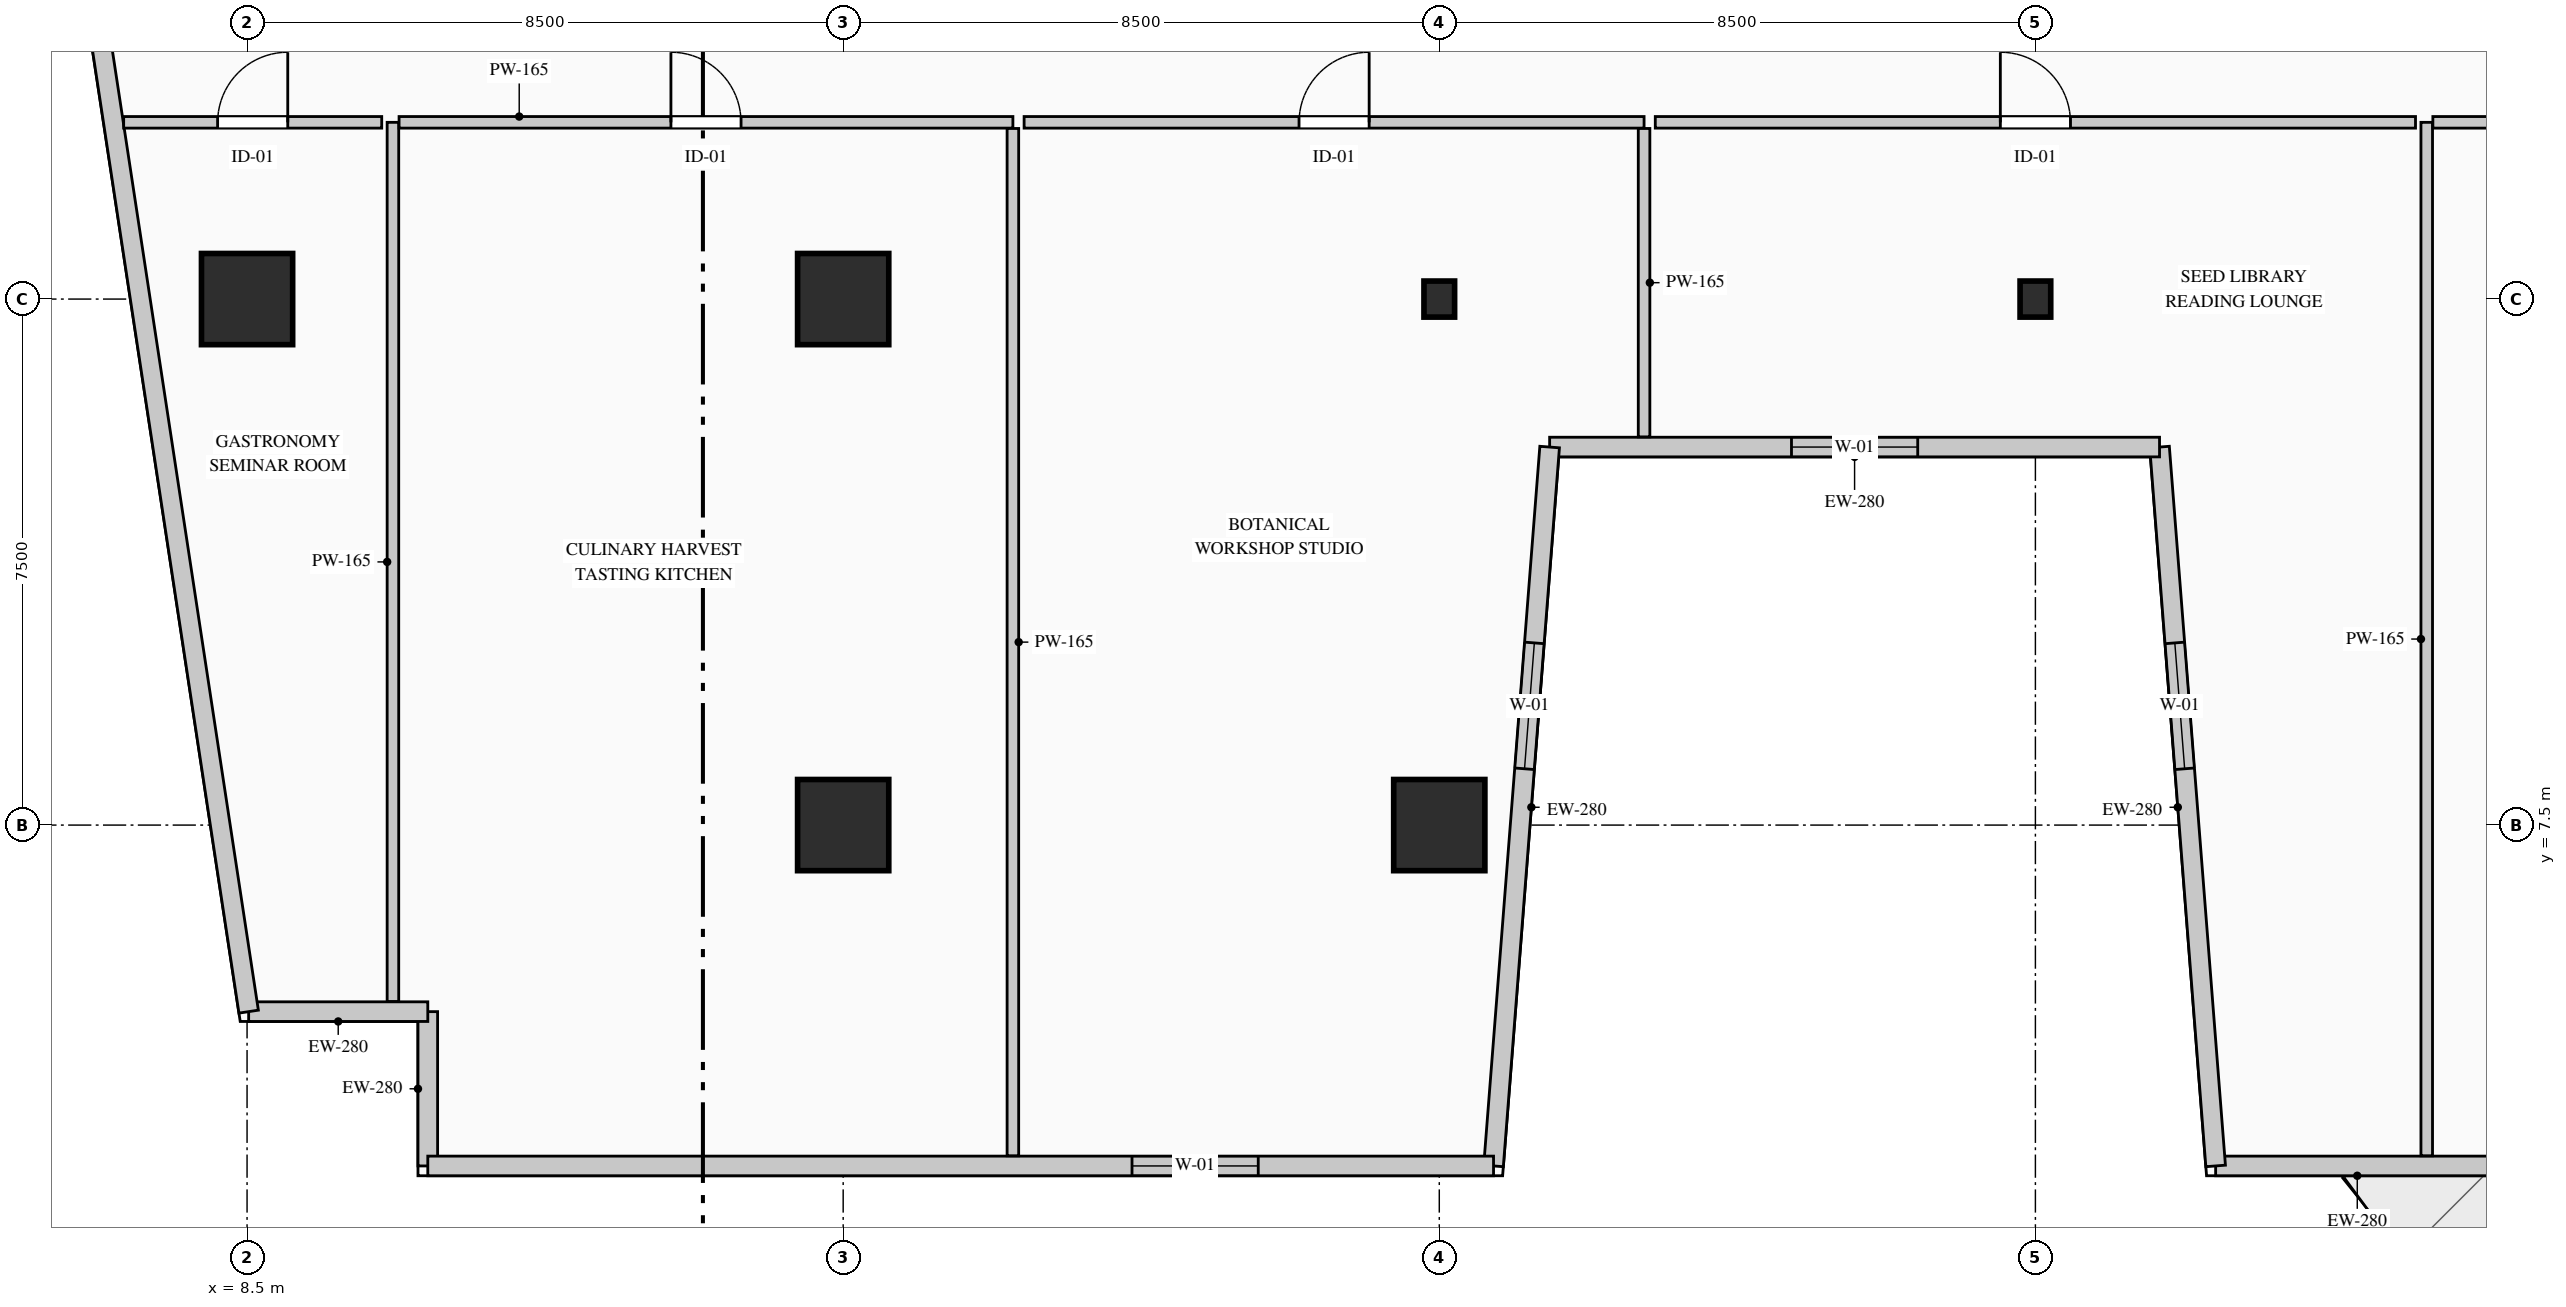
"""IFC4 building model, lengths in metres.
Left out: names, types, materials, properties, quantities, classifications, styles, units other than length and angle.
Written with IfcOpenShell. Run it as: python <this file> out.ifc"""

import sys

from ifc_helpers import new_model, si_unit, direction, frame, frame_2d, origin, origin_2d, place, context, subcontext, project, spatial, rectangle, i_section, extrude, element, fill, save


model = new_model("IFC4")
c1 = context("Model", 3, precision=1e-05, world=origin(), true_north=direction((0.0, 1.0)))
c2 = subcontext(c1, "Body", "Model", "MODEL_VIEW")
j1 = project(units=[si_unit("LENGTHUNIT", "METRE"), si_unit("PLANEANGLEUNIT", "RADIAN")], contexts=[c1])
p1 = place(None, origin())
s1 = spatial("IfcSite", under=j1, at=p1, CompositionType="ELEMENT")
p2 = place(p1, origin())
s2 = spatial("IfcBuilding", under=s1, at=p2, CompositionType="ELEMENT")
p3 = place(p2, frame((0.0, 0.0, 84.2)))
s3 = spatial("IfcBuildingStorey", under=s2, at=p3, CompositionType="ELEMENT", Elevation=84.2)
for number, where, z_axis, x_axis in (
    (1, (8.5, 15.0, 0.0), (0.0, 0.0, 1.0), (1.0, 0.0, 0.0)),
    (2, (17.0, 7.5, 0.0), (0.0, 0.0, 1.0), (1.0, 0.0, 0.0)),
    (3, (17.0, 15.0, 0.0), (0.0, 0.0, 1.0), (1.0, 0.0, 0.0)),
    (4, (25.5, 7.5, 0.0), (0.0, 0.0, 1.0), (1.0, 0.0, 0.0)),
):
    element("IfcColumn", number, at=place(p3, frame(where, z_axis=z_axis, x_axis=x_axis)), inside=s3, PredefinedType="COLUMN", context=c2, shape_type="SweptSolid", body=[
        extrude(rectangle(XDim=1.3, YDim=1.3, at=origin_2d()), origin(), (0.0, 0.0, 1.0), 4.4),
    ])
for number, where, z_axis, x_axis in (
    (5, (25.5, 15.0, 0.0), (0.0, 0.0, 1.0), (1.0, 0.0, 0.0)),
    (6, (34.0, 15.0, 0.0), (0.0, 0.0, 1.0), (1.0, 0.0, 0.0)),
):
    element("IfcColumn", number, at=place(p3, frame(where, z_axis=z_axis, x_axis=x_axis)), inside=s3, PredefinedType="COLUMN", context=c2, shape_type="SweptSolid", body=[
        extrude(i_section(OverallWidth=0.437, OverallDepth=0.514, WebThickness=0.061, FlangeThickness=0.077, FilletRadius=0.015, at=origin_2d()), origin(), (0.0, 0.0, 1.0), 4.4),
    ])
p4 = place(p3, frame((11.077, 2.64, 0.0), z_axis=(0.0, 0.0, 1.0), x_axis=(0.0, 1.0, 0.0)))
e7 = element("IfcWall", 7, at=p4, inside=s3, PredefinedType="STANDARD", context=c2, shape_type="SweptSolid", body=[
    extrude(rectangle(XDim=2.2, YDim=0.28, at=frame_2d((1.1, 0.0))), origin(), (0.0, 0.0, 1.0), 4.115),
])
p5 = place(p3, frame((11.077, 4.84, 0.0), z_axis=(0.0, 0.0, 1.0), x_axis=(-1.0, 0.0, 0.0)))
e8 = element("IfcWall", 8, at=p5, inside=s3, PredefinedType="STANDARD", context=c2, shape_type="SweptSolid", body=[
    extrude(rectangle(XDim=2.554, YDim=0.28, at=frame_2d((1.277, 0.0))), origin(), (0.0, 0.0, 1.0), 4.115),
])
p6 = place(p3, frame((8.523, 4.84, 0.0), z_axis=(0.0, 0.0, 1.0), x_axis=(-0.150394554312, 0.988626055712, 0.0)))
e9 = element("IfcWall", 9, at=p6, inside=s3, PredefinedType="STANDARD", context=c2, shape_type="SweptSolid", body=[
    extrude(rectangle(XDim=36.738, YDim=0.28, at=frame_2d((18.369, 0.0))), origin(), (0.0, 0.0, 1.0), 4.115),
])
p7 = place(p6, frame((22.612, 0.0, 0.9)))
e10 = element("IfcOpeningElement", 10, at=p7, cuts=e9, PredefinedType="OPENING", context=c2, shape_type="SweptSolid", body=[
    extrude(rectangle(XDim=1.8, YDim=2.1, at=frame_2d((0.9, 1.05))), frame((0.0, 0.15, 0.0), z_axis=(0.0, -1.0, 0.0), x_axis=(1.0, 0.0, 0.0)), (0.0, 0.0, 1.0), 0.3),
])
p8 = place(p3, frame((46.547, 2.64, 0.0), z_axis=(0.0, 0.0, 1.0), x_axis=(-1.0, 0.0, 0.0)))
e11 = element("IfcWall", 11, at=p8, inside=s3, PredefinedType="STANDARD", context=c2, shape_type="SweptSolid", body=[
    extrude(rectangle(XDim=9.977, YDim=0.28, at=frame_2d((4.989, 0.0))), origin(), (0.0, 0.0, 1.0), 4.115),
])
p9 = place(p8, frame((4.388, 0.0, 0.0)))
e12 = element("IfcOpeningElement", 12, at=p9, cuts=e11, PredefinedType="OPENING", context=c2, shape_type="SweptSolid", body=[
    extrude(rectangle(XDim=1.2, YDim=2.2, at=frame_2d((0.6, 1.1))), frame((0.0, 0.15, 0.0), z_axis=(0.0, -1.0, 0.0), x_axis=(1.0, 0.0, 0.0)), (0.0, 0.0, 1.0), 0.3),
])
p10 = place(p3, frame((36.57, 2.64, 0.0), z_axis=(0.0, 0.0, 1.0), x_axis=(-0.077816860153, 0.996967670627, 0.0)))
e13 = element("IfcWall", 13, at=p10, inside=s3, PredefinedType="STANDARD", context=c2, shape_type="SweptSolid", body=[
    extrude(rectangle(XDim=10.281, YDim=0.28, at=frame_2d((5.141, 0.0))), origin(), (0.0, 0.0, 1.0), 4.115),
])
p11 = place(p10, frame((5.68, 0.0, 0.9)))
e14 = element("IfcOpeningElement", 14, at=p11, cuts=e13, PredefinedType="OPENING", context=c2, shape_type="SweptSolid", body=[
    extrude(rectangle(XDim=1.8, YDim=2.1, at=frame_2d((0.9, 1.05))), frame((0.0, 0.15, 0.0), z_axis=(0.0, -1.0, 0.0), x_axis=(1.0, 0.0, 0.0)), (0.0, 0.0, 1.0), 0.3),
])
p12 = place(p3, frame((35.77, 12.89, 0.0), z_axis=(0.0, 0.0, 1.0), x_axis=(-1.0, 0.0, 0.0)))
e15 = element("IfcWall", 15, at=p12, inside=s3, PredefinedType="STANDARD", context=c2, shape_type="SweptSolid", body=[
    extrude(rectangle(XDim=8.697, YDim=0.28, at=frame_2d((4.348, 0.0))), origin(), (0.0, 0.0, 1.0), 4.115),
])
p13 = place(p12, frame((3.448, 0.0, 0.9)))
e16 = element("IfcOpeningElement", 16, at=p13, cuts=e15, PredefinedType="OPENING", context=c2, shape_type="SweptSolid", body=[
    extrude(rectangle(XDim=1.8, YDim=2.1, at=frame_2d((0.9, 1.05))), frame((0.0, 0.15, 0.0), z_axis=(0.0, -1.0, 0.0), x_axis=(1.0, 0.0, 0.0)), (0.0, 0.0, 1.0), 0.3),
])
p14 = place(p3, frame((27.073, 12.89, 0.0), z_axis=(0.0, 0.0, 1.0), x_axis=(-0.077816860153, -0.996967670627, 0.0)))
e17 = element("IfcWall", 17, at=p14, inside=s3, PredefinedType="STANDARD", context=c2, shape_type="SweptSolid", body=[
    extrude(rectangle(XDim=10.281, YDim=0.28, at=frame_2d((5.141, 0.0))), origin(), (0.0, 0.0, 1.0), 4.115),
])
p15 = place(p14, frame((2.801, 0.0, 0.9)))
e18 = element("IfcOpeningElement", 18, at=p15, cuts=e17, PredefinedType="OPENING", context=c2, shape_type="SweptSolid", body=[
    extrude(rectangle(XDim=1.8, YDim=2.1, at=frame_2d((0.9, 1.05))), frame((0.0, 0.15, 0.0), z_axis=(0.0, -1.0, 0.0), x_axis=(1.0, 0.0, 0.0)), (0.0, 0.0, 1.0), 0.3),
])
p16 = place(p3, frame((26.273, 2.64, 0.0), z_axis=(0.0, 0.0, 1.0), x_axis=(-1.0, 0.0, 0.0)))
e19 = element("IfcWall", 19, at=p16, inside=s3, PredefinedType="STANDARD", context=c2, shape_type="SweptSolid", body=[
    extrude(rectangle(XDim=15.197, YDim=0.28, at=frame_2d((7.598, 0.0))), origin(), (0.0, 0.0, 1.0), 4.115),
])
p17 = place(p16, frame((3.355, 0.0, 0.9)))
e20 = element("IfcOpeningElement", 20, at=p17, cuts=e19, PredefinedType="OPENING", context=c2, shape_type="SweptSolid", body=[
    extrude(rectangle(XDim=1.8, YDim=2.1, at=frame_2d((0.9, 1.05))), frame((0.0, 0.15, 0.0), z_axis=(0.0, -1.0, 0.0), x_axis=(1.0, 0.0, 0.0)), (0.0, 0.0, 1.0), 0.3),
])
p18 = place(p3, frame((10.58, 4.985, 0.0), z_axis=(0.0, 0.0, 1.0), x_axis=(0.0, 1.0, 0.0)))
e21 = element("IfcWall", 21, at=p18, inside=s3, PredefinedType="PARTITIONING", context=c2, shape_type="SweptSolid", body=[
    extrude(rectangle(XDim=12.535, YDim=0.165, at=frame_2d((6.268, 0.0))), origin(), (0.0, 0.0, 1.0), 4.115),
])
p19 = place(p3, frame((10.667, 17.52, 0.0), z_axis=(0.0, 0.0, 1.0), x_axis=(1.0, 0.0, 0.0)))
e22 = element("IfcWall", 22, at=p19, inside=s3, PredefinedType="PARTITIONING", context=c2, shape_type="SweptSolid", body=[
    extrude(rectangle(XDim=8.752, YDim=0.165, at=frame_2d((4.376, 0.0))), origin(), (0.0, 0.0, 1.0), 4.115),
])
p20 = place(p19, frame((3.876, 0.0, 0.0)))
e23 = element("IfcOpeningElement", 23, at=p20, cuts=e22, PredefinedType="OPENING", context=c2, shape_type="SweptSolid", body=[
    extrude(rectangle(XDim=1.0, YDim=2.15, at=frame_2d((0.5, 1.075))), frame((0.0, 0.093, 0.0), z_axis=(0.0, -1.0, 0.0), x_axis=(1.0, 0.0, 0.0)), (0.0, 0.0, 1.0), 0.185),
])
p21 = place(p3, frame((19.42, 17.433, 0.0), z_axis=(0.0, 0.0, 1.0), x_axis=(0.0, -1.0, 0.0)))
e24 = element("IfcWall", 24, at=p21, inside=s3, PredefinedType="PARTITIONING", context=c2, shape_type="SweptSolid", body=[
    extrude(rectangle(XDim=14.648, YDim=0.165, at=frame_2d((7.324, 0.0))), origin(), (0.0, 0.0, 1.0), 3.8),
])
p22 = place(p3, frame((19.58, 17.52, 0.0), z_axis=(0.0, 0.0, 1.0), x_axis=(1.0, 0.0, 0.0)))
e25 = element("IfcWall", 25, at=p22, inside=s3, PredefinedType="PARTITIONING", context=c2, shape_type="SweptSolid", body=[
    extrude(rectangle(XDim=8.84, YDim=0.165, at=frame_2d((4.42, 0.0))), origin(), (0.0, 0.0, 1.0), 3.8),
])
p23 = place(p22, frame((3.92, 0.0, 0.0)))
e26 = element("IfcOpeningElement", 26, at=p23, cuts=e25, PredefinedType="OPENING", context=c2, shape_type="SweptSolid", body=[
    extrude(rectangle(XDim=1.0, YDim=2.15, at=frame_2d((0.5, 1.075))), frame((0.0, 0.093, 0.0), z_axis=(0.0, -1.0, 0.0), x_axis=(1.0, 0.0, 0.0)), (0.0, 0.0, 1.0), 0.185),
])
p24 = place(p3, frame((28.42, 17.433, 0.0), z_axis=(0.0, 0.0, 1.0), x_axis=(0.0, -1.0, 0.0)))
e27 = element("IfcWall", 27, at=p24, inside=s3, PredefinedType="PARTITIONING", context=c2, shape_type="SweptSolid", body=[
    extrude(rectangle(XDim=4.398, YDim=0.165, at=frame_2d((2.199, 0.0))), origin(), (0.0, 0.0, 1.0), 4.115),
])
p25 = place(p3, frame((39.58, 2.785, 0.0), z_axis=(0.0, 0.0, 1.0), x_axis=(0.0, 1.0, 0.0)))
e28 = element("IfcWall", 28, at=p25, inside=s3, PredefinedType="PARTITIONING", context=c2, shape_type="SweptSolid", body=[
    extrude(rectangle(XDim=14.735, YDim=0.165, at=frame_2d((7.368, 0.0))), origin(), (0.0, 0.0, 1.0), 4.115),
])
p26 = place(p3, frame((39.667, 17.52, 0.0), z_axis=(0.0, 0.0, 1.0), x_axis=(1.0, 0.0, 0.0)))
e29 = element("IfcWall", 29, at=p26, inside=s3, PredefinedType="PARTITIONING", context=c2, shape_type="SweptSolid", body=[
    extrude(rectangle(XDim=5.282, YDim=0.165, at=frame_2d((2.641, 0.0))), origin(), (0.0, 0.0, 1.0), 4.115),
])
p27 = place(p26, frame((2.141, 0.0, 0.0)))
e30 = element("IfcOpeningElement", 30, at=p27, cuts=e29, PredefinedType="OPENING", context=c2, shape_type="SweptSolid", body=[
    extrude(rectangle(XDim=1.0, YDim=2.15, at=frame_2d((0.5, 1.075))), frame((0.0, 0.093, 0.0), z_axis=(0.0, -1.0, 0.0), x_axis=(1.0, 0.0, 0.0)), (0.0, 0.0, 1.0), 0.185),
])
p28 = place(p3, frame((6.74, 17.52, 0.0), z_axis=(0.0, 0.0, 1.0), x_axis=(1.0, 0.0, 0.0)))
e31 = element("IfcWall", 31, at=p28, inside=s3, PredefinedType="PARTITIONING", context=c2, shape_type="SweptSolid", body=[
    extrude(rectangle(XDim=3.679, YDim=0.165, at=frame_2d((1.84, 0.0))), origin(), (0.0, 0.0, 1.0), 4.115),
])
p29 = place(p28, frame((1.34, 0.0, 0.0)))
e32 = element("IfcOpeningElement", 32, at=p29, cuts=e31, PredefinedType="OPENING", context=c2, shape_type="SweptSolid", body=[
    extrude(rectangle(XDim=1.0, YDim=2.15, at=frame_2d((0.5, 1.075))), frame((0.0, 0.093, 0.0), z_axis=(0.0, -1.0, 0.0), x_axis=(1.0, 0.0, 0.0)), (0.0, 0.0, 1.0), 0.185),
])
p30 = place(p3, frame((28.58, 17.52, 0.0), z_axis=(0.0, 0.0, 1.0), x_axis=(1.0, 0.0, 0.0)))
e33 = element("IfcWall", 33, at=p30, inside=s3, PredefinedType="PARTITIONING", context=c2, shape_type="SweptSolid", body=[
    extrude(rectangle(XDim=10.84, YDim=0.165, at=frame_2d((5.42, 0.0))), origin(), (0.0, 0.0, 1.0), 3.8),
])
p31 = place(p30, frame((4.92, 0.0, 0.0)))
e34 = element("IfcOpeningElement", 34, at=p31, cuts=e33, PredefinedType="OPENING", context=c2, shape_type="SweptSolid", body=[
    extrude(rectangle(XDim=1.0, YDim=2.15, at=frame_2d((0.5, 1.075))), frame((0.0, 0.093, 0.0), z_axis=(0.0, -1.0, 0.0), x_axis=(1.0, 0.0, 0.0)), (0.0, 0.0, 1.0), 0.185),
])
p32 = place(p11, origin())
e35 = element("IfcWindow", 35, at=p32, inside=s3, PartitioningType="SINGLE_PANEL", PredefinedType="WINDOW", context=c2, shape_type="SweptSolid", body=[
    extrude(rectangle(XDim=1.8, YDim=2.1, at=frame_2d((0.9, 1.05))), frame((0.0, 0.03, 0.0), z_axis=(0.0, -1.0, 0.0), x_axis=(1.0, 0.0, 0.0)), (0.0, 0.0, 1.0), 0.06),
])
fill(e14, e35)
p33 = place(p13, origin())
e36 = element("IfcWindow", 36, at=p33, inside=s3, PartitioningType="SINGLE_PANEL", PredefinedType="WINDOW", context=c2, shape_type="SweptSolid", body=[
    extrude(rectangle(XDim=1.8, YDim=2.1, at=frame_2d((0.9, 1.05))), frame((0.0, 0.03, 0.0), z_axis=(0.0, -1.0, 0.0), x_axis=(1.0, 0.0, 0.0)), (0.0, 0.0, 1.0), 0.06),
])
fill(e16, e36)
p34 = place(p15, origin())
e37 = element("IfcWindow", 37, at=p34, inside=s3, PartitioningType="SINGLE_PANEL", PredefinedType="WINDOW", context=c2, shape_type="SweptSolid", body=[
    extrude(rectangle(XDim=1.8, YDim=2.1, at=frame_2d((0.9, 1.05))), frame((0.0, 0.03, 0.0), z_axis=(0.0, -1.0, 0.0), x_axis=(1.0, 0.0, 0.0)), (0.0, 0.0, 1.0), 0.06),
])
fill(e18, e37)
p35 = place(p17, origin())
e38 = element("IfcWindow", 38, at=p35, inside=s3, PartitioningType="SINGLE_PANEL", PredefinedType="WINDOW", context=c2, shape_type="SweptSolid", body=[
    extrude(rectangle(XDim=1.8, YDim=2.1, at=frame_2d((0.9, 1.05))), frame((0.0, 0.03, 0.0), z_axis=(0.0, -1.0, 0.0), x_axis=(1.0, 0.0, 0.0)), (0.0, 0.0, 1.0), 0.06),
])
fill(e20, e38)
p36 = place(p20, origin())
e39 = element("IfcDoor", 39, at=p36, inside=s3, OperationType="SINGLE_SWING_LEFT", PredefinedType="DOOR", context=c2, shape_type="SweptSolid", body=[
    extrude(rectangle(XDim=1.0, YDim=2.15, at=frame_2d((0.5, 1.075))), frame((0.0, 0.025, 0.0), z_axis=(0.0, -1.0, 0.0), x_axis=(1.0, 0.0, 0.0)), (0.0, 0.0, 1.0), 0.05),
])
fill(e23, e39)
p37 = place(p23, origin())
e40 = element("IfcDoor", 40, at=p37, inside=s3, OperationType="SINGLE_SWING_RIGHT", PredefinedType="DOOR", context=c2, shape_type="SweptSolid", body=[
    extrude(rectangle(XDim=1.0, YDim=2.15, at=frame_2d((0.5, 1.075))), frame((0.0, 0.025, 0.0), z_axis=(0.0, -1.0, 0.0), x_axis=(1.0, 0.0, 0.0)), (0.0, 0.0, 1.0), 0.05),
])
fill(e26, e40)
p38 = place(p29, origin())
e41 = element("IfcDoor", 41, at=p38, inside=s3, OperationType="SINGLE_SWING_RIGHT", PredefinedType="DOOR", context=c2, shape_type="SweptSolid", body=[
    extrude(rectangle(XDim=1.0, YDim=2.15, at=frame_2d((0.5, 1.075))), frame((0.0, 0.025, 0.0), z_axis=(0.0, -1.0, 0.0), x_axis=(1.0, 0.0, 0.0)), (0.0, 0.0, 1.0), 0.05),
])
fill(e32, e41)
p39 = place(p31, origin())
e42 = element("IfcDoor", 42, at=p39, inside=s3, OperationType="SINGLE_SWING_LEFT", PredefinedType="DOOR", context=c2, shape_type="SweptSolid", body=[
    extrude(rectangle(XDim=1.0, YDim=2.15, at=frame_2d((0.5, 1.075))), frame((0.0, 0.025, 0.0), z_axis=(0.0, -1.0, 0.0), x_axis=(1.0, 0.0, 0.0)), (0.0, 0.0, 1.0), 0.05),
])
fill(e34, e42)
save(model, sys.argv[1])
